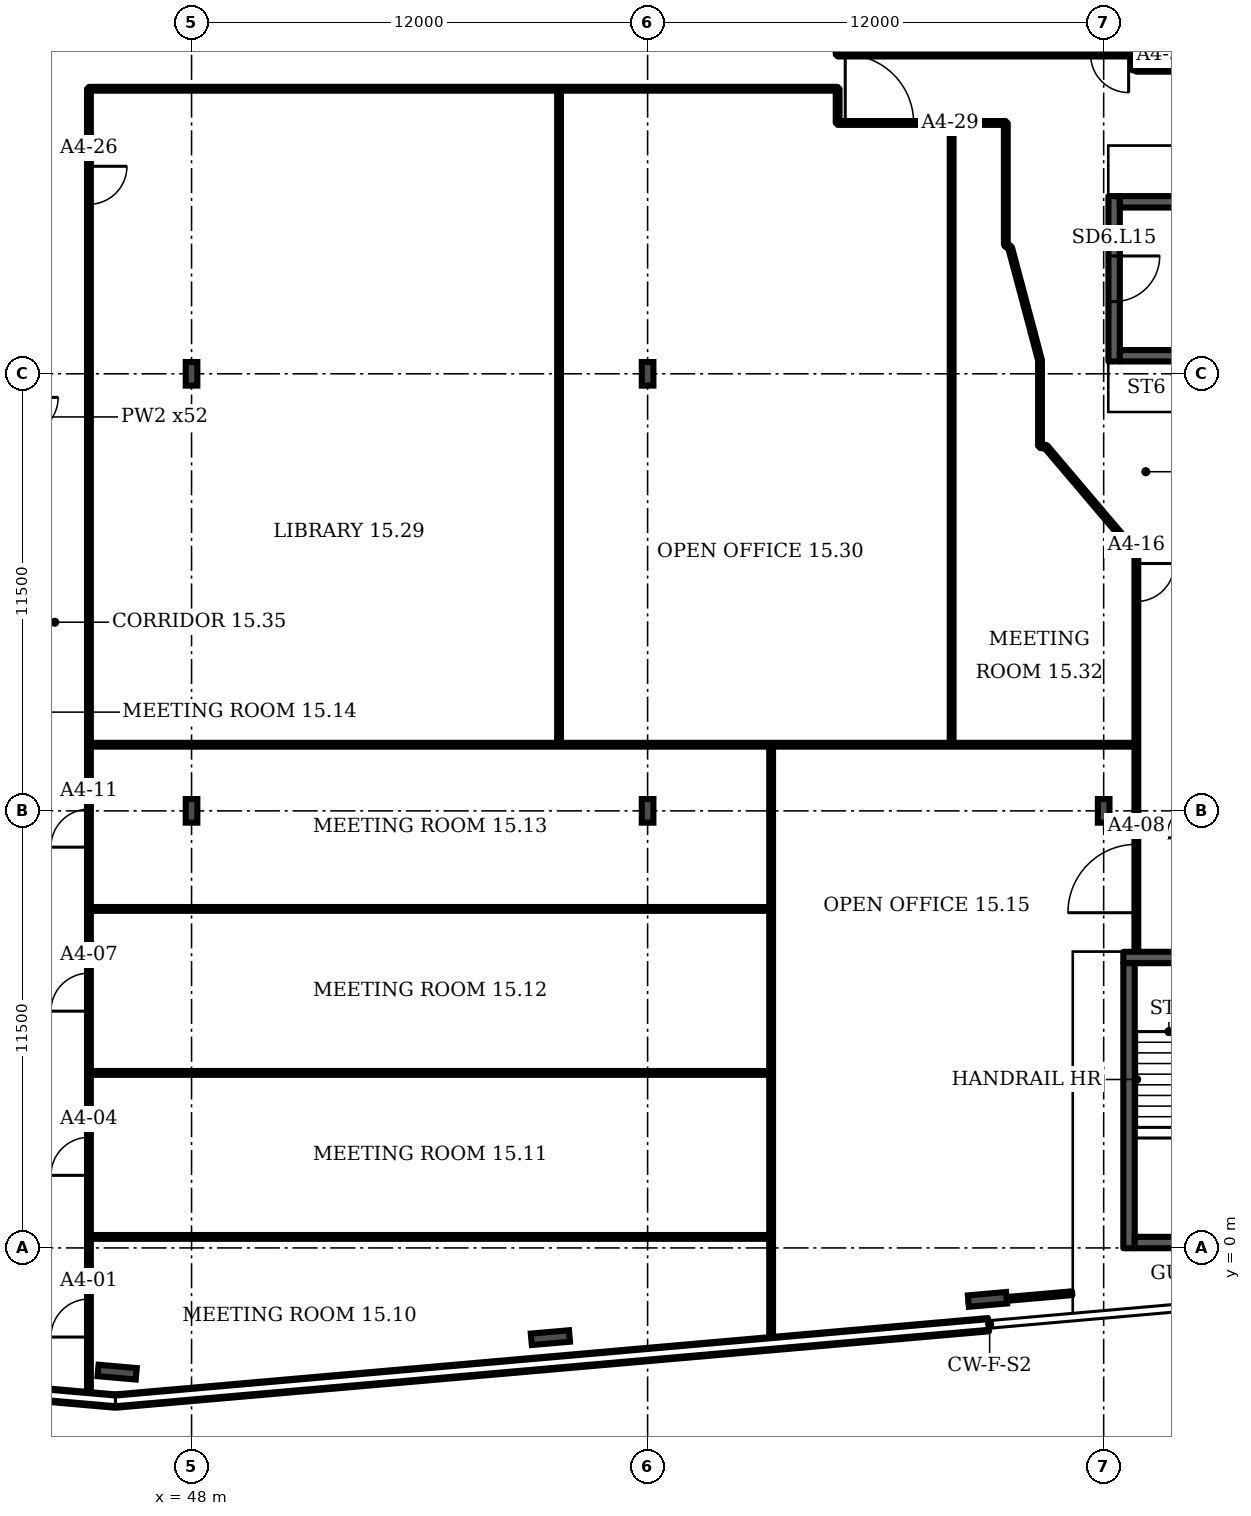
"""IFC4 building model, lengths in metres.
Left out: names, types, materials, properties, quantities, classifications, styles, units other than length and angle.
Written with IfcOpenShell. Run it as: python <this file> out.ifc"""

import sys

from ifc_helpers import new_model, si_unit, direction, frame, frame_2d, origin, origin_2d, place, context, subcontext, project, spatial, rectangle, i_section, extrude, element, fill, save


model = new_model("IFC4")
c1 = context("Model", 3, precision=1e-05, world=origin(), true_north=direction((0.0, 1.0)))
c2 = subcontext(c1, "Body", "Model", "MODEL_VIEW")
j1 = project(units=[si_unit("LENGTHUNIT", "METRE"), si_unit("PLANEANGLEUNIT", "RADIAN")], contexts=[c1])
p1 = place(None, origin())
s1 = spatial("IfcSite", under=j1, at=p1, CompositionType="ELEMENT")
p2 = place(p1, origin())
s2 = spatial("IfcBuilding", under=s1, at=p2, CompositionType="ELEMENT")
p3 = place(p2, frame((0.0, 0.0, 73.9)))
s3 = spatial("IfcBuildingStorey", under=s2, at=p3, CompositionType="ELEMENT", Elevation=73.9)
for number, where, z_axis, x_axis in (
    (1, (46.042, -3.268, 0.0), (0.0, 0.0, 1.0), (-0.087, -0.996, 0.0)),
    (2, (57.442, -2.361, 0.0), (0.0, 0.0, 1.0), (0.087, -0.996, 0.0)),
    (3, (68.942, -1.355, 0.0), (0.0, 0.0, 1.0), (0.087, -0.996, 0.0)),
):
    element("IfcColumn", number, at=place(p3, frame(where, z_axis=z_axis, x_axis=x_axis)), inside=s3, PredefinedType="COLUMN", context=c2, shape_type="SweptSolid", body=[
        extrude(i_section(OverallWidth=0.302, OverallDepth=1.008, WebThickness=0.021, FlangeThickness=0.04, FilletRadius=0.03, at=origin_2d()), origin(), (0.0, 0.0, 1.0), 3.6),
    ])
for number, where, z_axis, x_axis in (
    (4, (48.0, 11.5, 0.0), (0.0, 0.0, 1.0), (1.0, 0.0, 0.0)),
    (5, (60.0, 11.5, 0.0), (0.0, 0.0, 1.0), (1.0, 0.0, 0.0)),
    (6, (72.0, 11.5, 0.0), (0.0, 0.0, 1.0), (1.0, 0.0, 0.0)),
    (7, (48.0, 23.0, 0.0), (0.0, 0.0, 1.0), (1.0, 0.0, 0.0)),
    (8, (60.0, 23.0, 0.0), (0.0, 0.0, 1.0), (1.0, 0.0, 0.0)),
):
    element("IfcColumn", number, at=place(p3, frame(where, z_axis=z_axis, x_axis=x_axis)), inside=s3, PredefinedType="COLUMN", context=c2, shape_type="SweptSolid", body=[
        extrude(i_section(OverallWidth=0.305, OverallDepth=0.62, WebThickness=0.021, FlangeThickness=0.04, FilletRadius=0.027, at=origin_2d()), origin(), (0.0, 0.0, 1.0), 3.6),
    ])
p4 = place(p3, frame((34.601, -3.032, 0.0), z_axis=(0.0, 0.0, 1.0), x_axis=(0.996193, -0.087148, 0.0)))
e9 = element("IfcWall", 9, at=p4, inside=s3, PredefinedType="SOLIDWALL", context=c2, shape_type="SweptSolid", body=[
    extrude(rectangle(XDim=11.458, YDim=0.35, at=frame_2d((5.729, 0.0))), origin(), (0.0, 0.0, 1.0), 1.0),
])
p5 = place(p3, frame((46.045, -4.026, 0.0), z_axis=(0.0, 0.0, 1.0), x_axis=(0.99619, 0.087163, 0.0)))
e10 = element("IfcWall", 10, at=p5, inside=s3, PredefinedType="SOLIDWALL", context=c2, shape_type="SweptSolid", body=[
    extrude(rectangle(XDim=23.013, YDim=0.35, at=frame_2d((11.506, 0.0))), origin(), (0.0, 0.0, 1.0), 1.0),
])
p6 = place(p3, frame((72.518, 7.642, 0.0), z_axis=(0.0, 0.0, 1.0), x_axis=(1.0, 0.0, 0.0)))
e11 = element("IfcWall", 11, at=p6, inside=s3, PredefinedType="SHEAR", context=c2, shape_type="SweptSolid", body=[
    extrude(rectangle(XDim=4.35, YDim=0.3, at=frame_2d((2.175, 0.0))), origin(), (0.0, 0.0, 1.0), 3.2),
])
p7 = place(p6, frame((1.575, 0.0, 0.0)))
e12 = element("IfcOpeningElement", 12, at=p7, cuts=e11, PredefinedType="OPENING", context=c2, shape_type="SweptSolid", body=[
    extrude(rectangle(XDim=1.2, YDim=2.1, at=frame_2d((0.6, 1.05))), frame((0.0, 0.16, 0.0), z_axis=(0.0, -1.0, 0.0), x_axis=(1.0, 0.0, 0.0)), (0.0, 0.0, 1.0), 0.32),
])
p8 = place(p3, frame((72.275, 23.325, 0.0), z_axis=(0.0, 0.0, 1.0), x_axis=(0.0, 1.0, 0.0)))
e13 = element("IfcWall", 13, at=p8, inside=s3, PredefinedType="SHEAR", context=c2, shape_type="SweptSolid", body=[
    extrude(rectangle(XDim=4.35, YDim=0.3, at=frame_2d((2.175, 0.0))), origin(), (0.0, 0.0, 1.0), 3.2),
])
p9 = place(p8, frame((1.575, 0.0, 0.0)))
e14 = element("IfcOpeningElement", 14, at=p9, cuts=e13, PredefinedType="OPENING", context=c2, shape_type="SweptSolid", body=[
    extrude(rectangle(XDim=1.2, YDim=2.1, at=frame_2d((0.6, 1.05))), frame((0.0, 0.16, 0.0), z_axis=(0.0, -1.0, 0.0), x_axis=(1.0, 0.0, 0.0)), (0.0, 0.0, 1.0), 0.32),
])
p10 = place(p3, frame((45.3, -3.943, 0.0), z_axis=(0.0, 0.0, 1.0), x_axis=(0.0, 1.0, 0.0)))
e15 = element("IfcWall", 15, at=p10, inside=s3, PredefinedType="PARTITIONING", context=c2, shape_type="SweptSolid", body=[
    extrude(rectangle(XDim=34.443, YDim=0.1, at=frame_2d((17.222, 0.0))), origin(), (0.0, 0.0, 1.0), 2.58),
])
p11 = place(p10, frame((1.598, 0.0, 0.0)))
e16 = element("IfcOpeningElement", 16, at=p11, cuts=e15, PredefinedType="OPENING", context=c2, shape_type="SweptSolid", body=[
    extrude(rectangle(XDim=1.0, YDim=2.1, at=frame_2d((0.5, 1.05))), frame((0.0, 0.06, 0.0), z_axis=(0.0, -1.0, 0.0), x_axis=(1.0, 0.0, 0.0)), (0.0, 0.0, 1.0), 0.12),
])
p12 = place(p10, frame((5.853, 0.0, 0.0)))
e17 = element("IfcOpeningElement", 17, at=p12, cuts=e15, PredefinedType="OPENING", context=c2, shape_type="SweptSolid", body=[
    extrude(rectangle(XDim=1.0, YDim=2.1, at=frame_2d((0.5, 1.05))), frame((0.0, 0.06, 0.0), z_axis=(0.0, -1.0, 0.0), x_axis=(1.0, 0.0, 0.0)), (0.0, 0.0, 1.0), 0.12),
])
p13 = place(p10, frame((10.173, 0.0, 0.0)))
e18 = element("IfcOpeningElement", 18, at=p13, cuts=e15, PredefinedType="OPENING", context=c2, shape_type="SweptSolid", body=[
    extrude(rectangle(XDim=1.0, YDim=2.1, at=frame_2d((0.5, 1.05))), frame((0.0, 0.06, 0.0), z_axis=(0.0, -1.0, 0.0), x_axis=(1.0, 0.0, 0.0)), (0.0, 0.0, 1.0), 0.12),
])
p14 = place(p10, frame((14.488, 0.0, 0.0)))
e19 = element("IfcOpeningElement", 19, at=p14, cuts=e15, PredefinedType="OPENING", context=c2, shape_type="SweptSolid", body=[
    extrude(rectangle(XDim=1.0, YDim=2.1, at=frame_2d((0.5, 1.05))), frame((0.0, 0.06, 0.0), z_axis=(0.0, -1.0, 0.0), x_axis=(1.0, 0.0, 0.0)), (0.0, 0.0, 1.0), 0.12),
])
p15 = place(p10, frame((31.403, 0.0, 0.0)))
e20 = element("IfcOpeningElement", 20, at=p15, cuts=e15, PredefinedType="OPENING", context=c2, shape_type="SweptSolid", body=[
    extrude(rectangle(XDim=1.0, YDim=2.1, at=frame_2d((0.5, 1.05))), frame((0.0, 0.06, 0.0), z_axis=(0.0, -1.0, 0.0), x_axis=(1.0, 0.0, 0.0)), (0.0, 0.0, 1.0), 0.12),
])
for number, where, z_axis, x_axis in (
    (21, (45.3, 0.29, 0.0), (0.0, 0.0, 1.0), (1.0, 0.0, 0.0)),
    (22, (45.3, 4.605, 0.0), (0.0, 0.0, 1.0), (1.0, 0.0, 0.0)),
    (23, (45.3, 8.92, 0.0), (0.0, 0.0, 1.0), (1.0, 0.0, 0.0)),
):
    element("IfcWall", number, at=place(p3, frame(where, z_axis=z_axis, x_axis=x_axis)), inside=s3, PredefinedType="PARTITIONING", context=c2, shape_type="SweptSolid", body=[
        extrude(rectangle(XDim=17.95, YDim=0.1, at=frame_2d((8.975, 0.0))), origin(), (0.0, 0.0, 1.0), 3.2),
    ])
p16 = place(p3, frame((45.3, 13.24, 0.0), z_axis=(0.0, 0.0, 1.0), x_axis=(1.0, 0.0, 0.0)))
e24 = element("IfcWall", 24, at=p16, inside=s3, PredefinedType="PARTITIONING", context=c2, shape_type="SweptSolid", body=[
    extrude(rectangle(XDim=27.56, YDim=0.1, at=frame_2d((13.78, 0.0))), origin(), (0.0, 0.0, 1.0), 3.2),
])
p17 = place(p3, frame((45.3, 30.5, 0.0), z_axis=(0.0, 0.0, 1.0), x_axis=(1.0, 0.0, 0.0)))
e25 = element("IfcWall", 25, at=p17, inside=s3, PredefinedType="PARTITIONING", context=c2, shape_type="SweptSolid", body=[
    extrude(rectangle(XDim=19.7, YDim=0.1, at=frame_2d((9.85, 0.0))), origin(), (0.0, 0.0, 1.0), 3.2),
])
p18 = place(p3, frame((57.67, 13.24, 0.0), z_axis=(0.0, 0.0, 1.0), x_axis=(0.0, 1.0, 0.0)))
e26 = element("IfcWall", 26, at=p18, inside=s3, PredefinedType="PARTITIONING", context=c2, shape_type="SweptSolid", body=[
    extrude(rectangle(XDim=17.26, YDim=0.1, at=frame_2d((8.63, 0.0))), origin(), (0.0, 0.0, 1.0), 3.2),
])
p19 = place(p3, frame((63.25, -2.495, 0.0), z_axis=(0.0, 0.0, 1.0), x_axis=(0.0, 1.0, 0.0)))
e27 = element("IfcWall", 27, at=p19, inside=s3, PredefinedType="PARTITIONING", context=c2, shape_type="SweptSolid", body=[
    extrude(rectangle(XDim=15.735, YDim=0.1, at=frame_2d((7.868, 0.0))), origin(), (0.0, 0.0, 1.0), 2.58),
])
p20 = place(p3, frame((65.0, 29.6, 0.0), z_axis=(0.0, 0.0, 1.0), x_axis=(0.0, 1.0, 0.0)))
e28 = element("IfcWall", 28, at=p20, inside=s3, PredefinedType="PARTITIONING", context=c2, shape_type="SweptSolid", body=[
    extrude(rectangle(XDim=0.9, YDim=0.1, at=frame_2d((0.45, 0.0))), origin(), (0.0, 0.0, 1.0), 3.2),
])
p21 = place(p3, frame((65.0, 29.6, 0.0), z_axis=(0.0, 0.0, 1.0), x_axis=(1.0, 0.0, 0.0)))
e29 = element("IfcWall", 29, at=p21, inside=s3, PredefinedType="PARTITIONING", context=c2, shape_type="SweptSolid", body=[
    extrude(rectangle(XDim=4.425, YDim=0.1, at=frame_2d((2.212, 0.0))), origin(), (0.0, 0.0, 1.0), 3.2),
])
p22 = place(p21, frame((0.2, 0.0, 0.0)))
e30 = element("IfcOpeningElement", 30, at=p22, cuts=e29, PredefinedType="OPENING", context=c2, shape_type="SweptSolid", body=[
    extrude(rectangle(XDim=1.8, YDim=2.1, at=frame_2d((0.9, 1.05))), frame((0.0, 0.06, 0.0), z_axis=(0.0, -1.0, 0.0), x_axis=(1.0, 0.0, 0.0)), (0.0, 0.0, 1.0), 0.12),
])
p23 = place(p3, frame((65.0, 31.4, 0.0), z_axis=(0.0, 0.0, 1.0), x_axis=(0.0, 1.0, 0.0)))
e31 = element("IfcWall", 31, at=p23, inside=s3, PredefinedType="PARTITIONING", context=c2, shape_type="SweptSolid", body=[
    extrude(rectangle(XDim=2.58, YDim=0.1, at=frame_2d((1.29, 0.0))), origin(), (0.0, 0.0, 1.0), 3.2),
])
p24 = place(p23, frame((0.9, 0.0, 0.0)))
e32 = element("IfcOpeningElement", 32, at=p24, cuts=e31, PredefinedType="OPENING", context=c2, shape_type="SweptSolid", body=[
    extrude(rectangle(XDim=1.0, YDim=2.1, at=frame_2d((0.5, 1.05))), frame((0.0, 0.06, 0.0), z_axis=(0.0, -1.0, 0.0), x_axis=(1.0, 0.0, 0.0)), (0.0, 0.0, 1.0), 0.12),
])
p25 = place(p3, frame((65.0, 31.4, 0.0), z_axis=(0.0, 0.0, 1.0), x_axis=(1.0, 0.0, 0.0)))
e33 = element("IfcWall", 33, at=p25, inside=s3, PredefinedType="PARTITIONING", context=c2, shape_type="SweptSolid", body=[
    extrude(rectangle(XDim=7.81, YDim=0.1, at=frame_2d((3.905, 0.0))), origin(), (0.0, 0.0, 1.0), 3.2),
])
p26 = place(p25, frame((6.657, 0.0, 0.0)))
e34 = element("IfcOpeningElement", 34, at=p26, cuts=e33, PredefinedType="OPENING", context=c2, shape_type="SweptSolid", body=[
    extrude(rectangle(XDim=1.0, YDim=2.1, at=frame_2d((0.5, 1.05))), frame((0.0, 0.06, 0.0), z_axis=(0.0, -1.0, 0.0), x_axis=(1.0, 0.0, 0.0)), (0.0, 0.0, 1.0), 0.12),
])
p27 = place(p3, frame((68.0, 13.24, 0.0), z_axis=(0.0, 0.0, 1.0), x_axis=(0.0, 1.0, 0.0)))
e35 = element("IfcWall", 35, at=p27, inside=s3, PredefinedType="PARTITIONING", context=c2, shape_type="SweptSolid", body=[
    extrude(rectangle(XDim=16.36, YDim=0.1, at=frame_2d((8.18, 0.0))), origin(), (0.0, 0.0, 1.0), 3.2),
])
p28 = place(p3, frame((68.0, 31.4, 0.0), z_axis=(0.0, 0.0, 1.0), x_axis=(0.0, 1.0, 0.0)))
e36 = element("IfcWall", 36, at=p28, inside=s3, PredefinedType="PARTITIONING", context=c2, shape_type="SweptSolid", body=[
    extrude(rectangle(XDim=8.39, YDim=0.1, at=frame_2d((4.195, 0.0))), origin(), (0.0, 0.0, 1.0), 3.2),
])
p29 = place(p3, frame((68.445, -1.43, 0.0), z_axis=(0.0, 0.0, 1.0), x_axis=(0.996195, 0.087118, 0.0)))
e37 = element("IfcWall", 37, at=p29, inside=s3, PredefinedType="PARTITIONING", context=c2, shape_type="SweptSolid", body=[
    extrude(rectangle(XDim=2.738, YDim=0.1, at=frame_2d((1.369, 0.0))), origin(), (0.0, 0.0, 1.0), 2.58),
])
p30 = place(p3, frame((69.425, 26.4, 0.0), z_axis=(0.0, 0.0, 1.0), x_axis=(0.0, 1.0, 0.0)))
e38 = element("IfcWall", 38, at=p30, inside=s3, PredefinedType="PARTITIONING", context=c2, shape_type="SweptSolid", body=[
    extrude(rectangle(XDim=3.2, YDim=0.1, at=frame_2d((1.6, 0.0))), origin(), (0.0, 0.0, 1.0), 3.2),
])
p31 = place(p3, frame((69.54, 26.31, 0.0), z_axis=(0.0, 0.0, 1.0), x_axis=(-0.787997, 0.615675, 0.0)))
e39 = element("IfcWall", 39, at=p31, inside=s3, PredefinedType="PARTITIONING", context=c2, shape_type="SweptSolid", body=[
    extrude(rectangle(XDim=0.146, YDim=0.1, at=frame_2d((0.073, 0.0))), origin(), (0.0, 0.0, 1.0), 3.2),
])
p32 = place(p3, frame((70.13, 24.095, 0.0), z_axis=(0.0, 0.0, 1.0), x_axis=(-0.257318, 0.966327, 0.0)))
e40 = element("IfcWall", 40, at=p32, inside=s3, PredefinedType="PARTITIONING", context=c2, shape_type="SweptSolid", body=[
    extrude(rectangle(XDim=2.292, YDim=0.1, at=frame_2d((1.146, 0.0))), origin(), (0.0, 0.0, 1.0), 3.2),
])
p33 = place(p3, frame((70.325, 21.1, 0.0), z_axis=(0.0, 0.0, 1.0), x_axis=(0.0, 1.0, 0.0)))
e41 = element("IfcWall", 41, at=p33, inside=s3, PredefinedType="PARTITIONING", context=c2, shape_type="SweptSolid", body=[
    extrude(rectangle(XDim=2.255, YDim=0.1, at=frame_2d((1.127, 0.0))), origin(), (0.0, 0.0, 1.0), 3.2),
])
p34 = place(p3, frame((70.325, 23.355, 0.0), z_axis=(0.0, 0.0, 1.0), x_axis=(-0.254901, 0.966965, 0.0)))
e42 = element("IfcWall", 42, at=p34, inside=s3, PredefinedType="PARTITIONING", context=c2, shape_type="SweptSolid", body=[
    extrude(rectangle(XDim=0.765, YDim=0.1, at=frame_2d((0.383, 0.0))), origin(), (0.0, 0.0, 1.0), 3.2),
])
p35 = place(p3, frame((70.485, 21.075, 0.0), z_axis=(0.0, 0.0, 1.0), x_axis=(-0.987098, 0.160112, 0.0)))
e43 = element("IfcWall", 43, at=p35, inside=s3, PredefinedType="PARTITIONING", context=c2, shape_type="SweptSolid", body=[
    extrude(rectangle(XDim=0.157, YDim=0.1, at=frame_2d((0.079, 0.0))), origin(), (0.0, 0.0, 1.0), 3.2),
])
p36 = place(p3, frame((72.81, 30.985, 0.0), z_axis=(0.0, 0.0, 1.0), x_axis=(0.0, 1.0, 0.0)))
e44 = element("IfcWall", 44, at=p36, inside=s3, PredefinedType="PARTITIONING", context=c2, shape_type="SweptSolid", body=[
    extrude(rectangle(XDim=0.415, YDim=0.1, at=frame_2d((0.208, 0.0))), origin(), (0.0, 0.0, 1.0), 3.2),
])
p37 = place(p3, frame((72.86, 7.812, 0.0), z_axis=(0.0, 0.0, 1.0), x_axis=(0.0, 1.0, 0.0)))
e45 = element("IfcWall", 45, at=p37, inside=s3, PredefinedType="PARTITIONING", context=c2, shape_type="SweptSolid", body=[
    extrude(rectangle(XDim=10.463, YDim=0.1, at=frame_2d((5.231, 0.0))), origin(), (0.0, 0.0, 1.0), 3.2),
])
p38 = place(p37, frame((1.008, 0.0, 0.0)))
e46 = element("IfcOpeningElement", 46, at=p38, cuts=e45, PredefinedType="OPENING", context=c2, shape_type="SweptSolid", body=[
    extrude(rectangle(XDim=1.8, YDim=2.1, at=frame_2d((0.9, 1.05))), frame((0.0, 0.06, 0.0), z_axis=(0.0, -1.0, 0.0), x_axis=(1.0, 0.0, 0.0)), (0.0, 0.0, 1.0), 0.12),
])
p39 = place(p37, frame((9.197, 0.0, 0.0)))
e47 = element("IfcOpeningElement", 47, at=p39, cuts=e45, PredefinedType="OPENING", context=c2, shape_type="SweptSolid", body=[
    extrude(rectangle(XDim=1.0, YDim=2.1, at=frame_2d((0.5, 1.05))), frame((0.0, 0.06, 0.0), z_axis=(0.0, -1.0, 0.0), x_axis=(1.0, 0.0, 0.0)), (0.0, 0.0, 1.0), 0.12),
])
p40 = place(p3, frame((72.86, 31.0, 0.0), z_axis=(0.0, 0.0, 1.0), x_axis=(1.0, 0.0, 0.0)))
e48 = element("IfcWall", 48, at=p40, inside=s3, PredefinedType="PARTITIONING", context=c2, shape_type="SweptSolid", body=[
    extrude(rectangle(XDim=1.8, YDim=0.1, at=frame_2d((0.9, 0.0))), origin(), (0.0, 0.0, 1.0), 3.2),
])
p41 = place(p3, frame((72.86, 18.275, 0.0), z_axis=(0.0, 0.0, 1.0), x_axis=(-0.646848, 0.762613, 0.0)))
e49 = element("IfcWall", 49, at=p41, inside=s3, PredefinedType="PARTITIONING", context=c2, shape_type="SweptSolid", body=[
    extrude(rectangle(XDim=3.672, YDim=0.1, at=frame_2d((1.836, 0.0))), origin(), (0.0, 0.0, 1.0), 3.2),
])
p42 = place(p3, frame((72.667, -0.008, 0.0), z_axis=(0.0, 0.0, 1.0), x_axis=(0.0, 1.0, 0.0)))
e50 = element("IfcWall", 50, at=p42, inside=s3, PredefinedType="SHEAR", context=c2, shape_type="SweptSolid", body=[
    extrude(rectangle(XDim=7.5, YDim=0.3, at=frame_2d((3.75, 0.0))), origin(), (0.0, 0.0, 1.0), 3.2),
])
p43 = place(p3, frame((72.817, 0.142, 0.0), z_axis=(0.0, 0.0, 1.0), x_axis=(1.0, 0.0, 0.0)))
e51 = element("IfcWall", 51, at=p43, inside=s3, PredefinedType="SHEAR", context=c2, shape_type="SweptSolid", body=[
    extrude(rectangle(XDim=3.75, YDim=0.3, at=frame_2d((1.875, 0.0))), origin(), (0.0, 0.0, 1.0), 3.2),
])
for number, where, z_axis, x_axis in (
    (52, (72.425, 23.475, 0.0), (0.0, 0.0, 1.0), (1.0, 0.0, 0.0)),
    (53, (72.425, 27.525, 0.0), (0.0, 0.0, 1.0), (1.0, 0.0, 0.0)),
):
    element("IfcWall", number, at=place(p3, frame(where, z_axis=z_axis, x_axis=x_axis)), inside=s3, PredefinedType="SHEAR", context=c2, shape_type="SweptSolid", body=[
        extrude(rectangle(XDim=7.5, YDim=0.3, at=frame_2d((3.75, 0.0))), origin(), (0.0, 0.0, 1.0), 3.2),
    ])
p44 = place(p9, origin())
e54 = element("IfcDoor", 54, at=p44, inside=s3, OperationType="SINGLE_SWING_RIGHT", PredefinedType="DOOR", context=c2, shape_type="SweptSolid", body=[
    extrude(rectangle(XDim=1.2, YDim=2.1, at=frame_2d((0.6, 1.05))), frame((0.0, 0.025, 0.0), z_axis=(0.0, -1.0, 0.0), x_axis=(1.0, 0.0, 0.0)), (0.0, 0.0, 1.0), 0.05),
])
fill(e14, e54)
p45 = place(p11, origin())
e55 = element("IfcDoor", 55, at=p45, inside=s3, OperationType="SINGLE_SWING_LEFT", PredefinedType="DOOR", context=c2, shape_type="SweptSolid", body=[
    extrude(rectangle(XDim=1.0, YDim=2.1, at=frame_2d((0.5, 1.05))), frame((0.0, 0.025, 0.0), z_axis=(0.0, -1.0, 0.0), x_axis=(1.0, 0.0, 0.0)), (0.0, 0.0, 1.0), 0.05),
])
fill(e16, e55)
p46 = place(p12, origin())
e56 = element("IfcDoor", 56, at=p46, inside=s3, OperationType="SINGLE_SWING_LEFT", PredefinedType="DOOR", context=c2, shape_type="SweptSolid", body=[
    extrude(rectangle(XDim=1.0, YDim=2.1, at=frame_2d((0.5, 1.05))), frame((0.0, 0.025, 0.0), z_axis=(0.0, -1.0, 0.0), x_axis=(1.0, 0.0, 0.0)), (0.0, 0.0, 1.0), 0.05),
])
fill(e17, e56)
p47 = place(p13, origin())
e57 = element("IfcDoor", 57, at=p47, inside=s3, OperationType="SINGLE_SWING_LEFT", PredefinedType="DOOR", context=c2, shape_type="SweptSolid", body=[
    extrude(rectangle(XDim=1.0, YDim=2.1, at=frame_2d((0.5, 1.05))), frame((0.0, 0.025, 0.0), z_axis=(0.0, -1.0, 0.0), x_axis=(1.0, 0.0, 0.0)), (0.0, 0.0, 1.0), 0.05),
])
fill(e18, e57)
p48 = place(p38, origin())
e58 = element("IfcDoor", 58, at=p48, inside=s3, OperationType="DOUBLE_DOOR_SINGLE_SWING", PredefinedType="DOOR", context=c2, shape_type="SweptSolid", body=[
    extrude(rectangle(XDim=1.8, YDim=2.1, at=frame_2d((0.9, 1.05))), frame((0.0, 0.025, 0.0), z_axis=(0.0, -1.0, 0.0), x_axis=(1.0, 0.0, 0.0)), (0.0, 0.0, 1.0), 0.05),
])
fill(e46, e58)
p49 = place(p14, origin())
e59 = element("IfcDoor", 59, at=p49, inside=s3, OperationType="SINGLE_SWING_LEFT", PredefinedType="DOOR", context=c2, shape_type="SweptSolid", body=[
    extrude(rectangle(XDim=1.0, YDim=2.1, at=frame_2d((0.5, 1.05))), frame((0.0, 0.025, 0.0), z_axis=(0.0, -1.0, 0.0), x_axis=(1.0, 0.0, 0.0)), (0.0, 0.0, 1.0), 0.05),
])
fill(e19, e59)
p50 = place(p39, origin())
e60 = element("IfcDoor", 60, at=p50, inside=s3, OperationType="SINGLE_SWING_RIGHT", PredefinedType="DOOR", context=c2, shape_type="SweptSolid", body=[
    extrude(rectangle(XDim=1.0, YDim=2.1, at=frame_2d((0.5, 1.05))), frame((0.0, 0.025, 0.0), z_axis=(0.0, -1.0, 0.0), x_axis=(1.0, 0.0, 0.0)), (0.0, 0.0, 1.0), 0.05),
])
fill(e47, e60)
p51 = place(p15, origin())
e61 = element("IfcDoor", 61, at=p51, inside=s3, OperationType="SINGLE_SWING_RIGHT", PredefinedType="DOOR", context=c2, shape_type="SweptSolid", body=[
    extrude(rectangle(XDim=1.0, YDim=2.1, at=frame_2d((0.5, 1.05))), frame((0.0, 0.025, 0.0), z_axis=(0.0, -1.0, 0.0), x_axis=(1.0, 0.0, 0.0)), (0.0, 0.0, 1.0), 0.05),
])
fill(e20, e61)
p52 = place(p22, origin())
e62 = element("IfcDoor", 62, at=p52, inside=s3, OperationType="DOUBLE_DOOR_SINGLE_SWING", PredefinedType="DOOR", context=c2, shape_type="SweptSolid", body=[
    extrude(rectangle(XDim=1.8, YDim=2.1, at=frame_2d((0.9, 1.05))), frame((0.0, 0.025, 0.0), z_axis=(0.0, -1.0, 0.0), x_axis=(1.0, 0.0, 0.0)), (0.0, 0.0, 1.0), 0.05),
])
fill(e30, e62)
p53 = place(p26, origin())
e63 = element("IfcDoor", 63, at=p53, inside=s3, OperationType="SINGLE_SWING_RIGHT", PredefinedType="DOOR", context=c2, shape_type="SweptSolid", body=[
    extrude(rectangle(XDim=1.0, YDim=2.1, at=frame_2d((0.5, 1.05))), frame((0.0, 0.025, 0.0), z_axis=(0.0, -1.0, 0.0), x_axis=(1.0, 0.0, 0.0)), (0.0, 0.0, 1.0), 0.05),
])
fill(e34, e63)
save(model, sys.argv[1])
